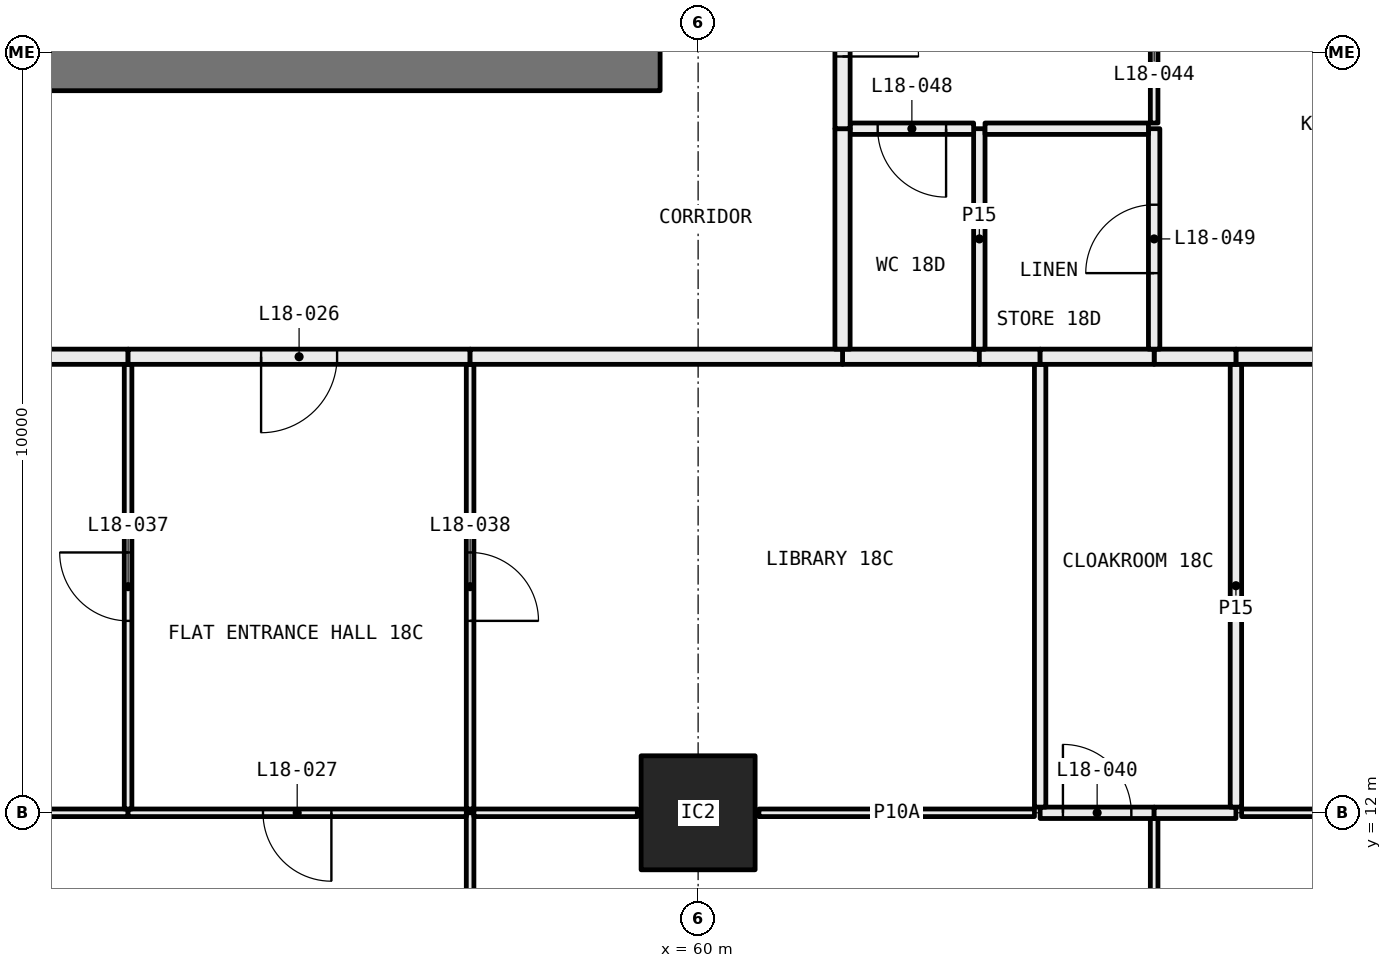
"""IFC4 building model, lengths in metres.
Left out: names, types, materials, properties, quantities, classifications, styles, units other than length and angle.
Written with IfcOpenShell. Run it as: python <this file> out.ifc"""

import sys

from ifc_helpers import new_model, si_unit, direction, frame, frame_2d, origin, origin_2d, place, context, subcontext, project, spatial, rectangle, hollow_rectangle, extrude, element, fill, save


model = new_model("IFC4")
c1 = context("Model", 3, precision=1e-05, world=origin(), true_north=direction((0.0, 1.0)))
c2 = subcontext(c1, "Body", "Model", "MODEL_VIEW")
j1 = project(units=[si_unit("LENGTHUNIT", "METRE"), si_unit("PLANEANGLEUNIT", "RADIAN")], contexts=[c1])
p1 = place(None, origin())
s1 = spatial("IfcSite", under=j1, at=p1, CompositionType="ELEMENT")
p2 = place(p1, origin())
s2 = spatial("IfcBuilding", under=s1, at=p2, CompositionType="ELEMENT")
p3 = place(p2, frame((0.0, 0.0, 74.85)))
s3 = spatial("IfcBuildingStorey", under=s2, at=p3, CompositionType="ELEMENT", Elevation=74.85)
p4 = place(p3, frame((60.0, 12.0, 0.0), z_axis=(0.0, 0.0, 1.0), x_axis=(1.0, 0.0, 0.0)))
e1 = element("IfcColumn", 1, at=p4, inside=s3, PredefinedType="COLUMN", context=c2, shape_type="SweptSolid", body=[
    extrude(hollow_rectangle(XDim=1.5, YDim=1.5, WallThickness=0.065, at=origin_2d()), origin(), (0.0, 0.0, 1.0), 3.05),
])
p5 = place(p3, frame((57.0, 6.05, 0.0), z_axis=(0.0, 0.0, 1.0), x_axis=(0.0, 1.0, 0.0)))
e2 = element("IfcWall", 2, at=p5, inside=s3, PredefinedType="PARTITIONING", context=c2, shape_type="SweptSolid", body=[
    extrude(rectangle(XDim=5.95, YDim=0.1, at=frame_2d((2.975, 0.0))), origin(), (0.0, 0.0, 1.0), 2.45),
])
p6 = place(p5, frame((2.525, 0.0, 0.0)))
e3 = element("IfcOpeningElement", 3, at=p6, cuts=e2, PredefinedType="OPENING", context=c2, shape_type="SweptSolid", body=[
    extrude(rectangle(XDim=0.9, YDim=2.1, at=frame_2d((0.45, 1.05))), frame((0.0, 0.06, 0.0), z_axis=(0.0, -1.0, 0.0), x_axis=(1.0, 0.0, 0.0)), (0.0, 0.0, 1.0), 0.12),
])
p7 = place(p3, frame((52.5, 12.0, 0.0), z_axis=(0.0, 0.0, 1.0), x_axis=(-1.0, 0.0, 0.0)))
e4 = element("IfcWall", 4, at=p7, inside=s3, PredefinedType="PARTITIONING", context=c2, shape_type="SweptSolid", body=[
    extrude(rectangle(XDim=3.7, YDim=0.1, at=frame_2d((1.85, 0.0))), origin(), (0.0, 0.0, 1.0), 2.45),
])
p8 = place(p3, frame((56.95, 12.0, 0.0), z_axis=(0.0, 0.0, 1.0), x_axis=(-1.0, 0.0, 0.0)))
e5 = element("IfcWall", 5, at=p8, inside=s3, PredefinedType="PARTITIONING", context=c2, shape_type="SweptSolid", body=[
    extrude(rectangle(XDim=4.45, YDim=0.1, at=frame_2d((2.225, 0.0))), origin(), (0.0, 0.0, 1.0), 2.45),
])
p9 = place(p8, frame((1.775, 0.0, 0.0)))
e6 = element("IfcOpeningElement", 6, at=p9, cuts=e5, PredefinedType="OPENING", context=c2, shape_type="SweptSolid", body=[
    extrude(rectangle(XDim=0.9, YDim=2.1, at=frame_2d((0.45, 1.05))), frame((0.0, 0.06, 0.0), z_axis=(0.0, -1.0, 0.0), x_axis=(1.0, 0.0, 0.0)), (0.0, 0.0, 1.0), 0.12),
])
p10 = place(p3, frame((66.0, 6.72, 0.0), z_axis=(0.0, 0.0, 1.0), x_axis=(0.0, 1.0, 0.0)))
e7 = element("IfcWall", 7, at=p10, inside=s3, PredefinedType="PARTITIONING", context=c2, shape_type="SweptSolid", body=[
    extrude(rectangle(XDim=5.205, YDim=0.1, at=frame_2d((2.603, 0.0))), origin(), (0.0, 0.0, 1.0), 2.45),
])
p11 = place(p10, frame((2.153, 0.0, 0.0)))
e8 = element("IfcOpeningElement", 8, at=p11, cuts=e7, PredefinedType="OPENING", context=c2, shape_type="SweptSolid", body=[
    extrude(rectangle(XDim=0.9, YDim=2.1, at=frame_2d((0.45, 1.05))), frame((0.0, 0.06, 0.0), z_axis=(0.0, -1.0, 0.0), x_axis=(1.0, 0.0, 0.0)), (0.0, 0.0, 1.0), 0.12),
])
p12 = place(p3, frame((59.2, 12.0, 0.0), z_axis=(0.0, 0.0, 1.0), x_axis=(-1.0, 0.0, 0.0)))
e9 = element("IfcWall", 9, at=p12, inside=s3, PredefinedType="PARTITIONING", context=c2, shape_type="SweptSolid", body=[
    extrude(rectangle(XDim=2.15, YDim=0.1, at=frame_2d((1.075, 0.0))), origin(), (0.0, 0.0, 1.0), 2.45),
])
p13 = place(p3, frame((64.425, 12.0, 0.0), z_axis=(0.0, 0.0, 1.0), x_axis=(-1.0, 0.0, 0.0)))
e10 = element("IfcWall", 10, at=p13, inside=s3, PredefinedType="PARTITIONING", context=c2, shape_type="SweptSolid", body=[
    extrude(rectangle(XDim=3.625, YDim=0.1, at=frame_2d((1.812, 0.0))), origin(), (0.0, 0.0, 1.0), 2.45),
])
p14 = place(p3, frame((66.0, 12.0, 0.0), z_axis=(0.0, 0.0, 1.0), x_axis=(-1.0, 0.0, 0.0)))
e11 = element("IfcWall", 11, at=p14, inside=s3, PredefinedType="PARTITIONING", context=c2, shape_type="SweptSolid", body=[
    extrude(rectangle(XDim=1.5, YDim=0.15, at=frame_2d((0.75, 0.0))), origin(), (0.0, 0.0, 1.0), 2.45),
])
p15 = place(p14, frame((0.3, 0.0, 0.0)))
e12 = element("IfcOpeningElement", 12, at=p15, cuts=e11, PredefinedType="OPENING", context=c2, shape_type="SweptSolid", body=[
    extrude(rectangle(XDim=0.9, YDim=2.1, at=frame_2d((0.45, 1.05))), frame((0.0, 0.085, 0.0), z_axis=(0.0, -1.0, 0.0), x_axis=(1.0, 0.0, 0.0)), (0.0, 0.0, 1.0), 0.17),
])
p16 = place(p3, frame((71.28, 12.0, 0.0), z_axis=(0.0, 0.0, 1.0), x_axis=(-1.0, 0.0, 0.0)))
e13 = element("IfcWall", 13, at=p16, inside=s3, PredefinedType="PARTITIONING", context=c2, shape_type="SweptSolid", body=[
    extrude(rectangle(XDim=4.129, YDim=0.1, at=frame_2d((2.064, 0.0))), origin(), (0.0, 0.0, 1.0), 2.45),
])
p17 = place(p16, frame((1.615, 0.0, 0.0)))
e14 = element("IfcOpeningElement", 14, at=p17, cuts=e13, PredefinedType="OPENING", context=c2, shape_type="SweptSolid", body=[
    extrude(rectangle(XDim=0.9, YDim=2.1, at=frame_2d((0.45, 1.05))), frame((0.0, 0.06, 0.0), z_axis=(0.0, -1.0, 0.0), x_axis=(1.0, 0.0, 0.0)), (0.0, 0.0, 1.0), 0.12),
])
p18 = place(p3, frame((67.076, 12.0, 0.0), z_axis=(0.0, 0.0, 1.0), x_axis=(-1.0, 0.0, 0.0)))
e15 = element("IfcWall", 15, at=p18, inside=s3, PredefinedType="PARTITIONING", context=c2, shape_type="SweptSolid", body=[
    extrude(rectangle(XDim=1.076, YDim=0.15, at=frame_2d((0.538, 0.0))), origin(), (0.0, 0.0, 1.0), 2.45),
])
p19 = place(p3, frame((52.5, 12.05, 0.0), z_axis=(0.0, 0.0, 1.0), x_axis=(0.0, 1.0, 0.0)))
e16 = element("IfcWall", 16, at=p19, inside=s3, PredefinedType="PARTITIONING", context=c2, shape_type="SweptSolid", body=[
    extrude(rectangle(XDim=5.85, YDim=0.1, at=frame_2d((2.925, 0.0))), origin(), (0.0, 0.0, 1.0), 2.45),
])
p20 = place(p19, frame((2.475, 0.0, 0.0)))
e17 = element("IfcOpeningElement", 17, at=p20, cuts=e16, PredefinedType="OPENING", context=c2, shape_type="SweptSolid", body=[
    extrude(rectangle(XDim=0.9, YDim=2.1, at=frame_2d((0.45, 1.05))), frame((0.0, 0.06, 0.0), z_axis=(0.0, -1.0, 0.0), x_axis=(1.0, 0.0, 0.0)), (0.0, 0.0, 1.0), 0.12),
])
p21 = place(p3, frame((52.5, 18.0, 0.0), z_axis=(0.0, 0.0, 1.0), x_axis=(-1.0, 0.0, 0.0)))
e18 = element("IfcWall", 18, at=p21, inside=s3, PredefinedType="PARTITIONING", context=c2, shape_type="SweptSolid", body=[
    extrude(rectangle(XDim=6.4, YDim=0.2, at=frame_2d((3.2, 0.0))), origin(), (0.0, 0.0, 1.0), 3.05),
])
p22 = place(p3, frame((57.0, 12.05, 0.0), z_axis=(0.0, 0.0, 1.0), x_axis=(0.0, 1.0, 0.0)))
e19 = element("IfcWall", 19, at=p22, inside=s3, PredefinedType="PARTITIONING", context=c2, shape_type="SweptSolid", body=[
    extrude(rectangle(XDim=5.85, YDim=0.1, at=frame_2d((2.925, 0.0))), origin(), (0.0, 0.0, 1.0), 2.45),
])
p23 = place(p22, frame((2.475, 0.0, 0.0)))
e20 = element("IfcOpeningElement", 20, at=p23, cuts=e19, PredefinedType="OPENING", context=c2, shape_type="SweptSolid", body=[
    extrude(rectangle(XDim=0.9, YDim=2.1, at=frame_2d((0.45, 1.05))), frame((0.0, 0.06, 0.0), z_axis=(0.0, -1.0, 0.0), x_axis=(1.0, 0.0, 0.0)), (0.0, 0.0, 1.0), 0.12),
])
p24 = place(p3, frame((57.0, 18.0, 0.0), z_axis=(0.0, 0.0, 1.0), x_axis=(-1.0, 0.0, 0.0)))
e21 = element("IfcWall", 21, at=p24, inside=s3, PredefinedType="PARTITIONING", context=c2, shape_type="SweptSolid", body=[
    extrude(rectangle(XDim=4.5, YDim=0.2, at=frame_2d((2.25, 0.0))), origin(), (0.0, 0.0, 1.0), 3.05),
])
p25 = place(p24, frame((1.75, 0.0, 0.0)))
e22 = element("IfcOpeningElement", 22, at=p25, cuts=e21, PredefinedType="OPENING", context=c2, shape_type="SweptSolid", body=[
    extrude(rectangle(XDim=1.0, YDim=2.1, at=frame_2d((0.5, 1.05))), frame((0.0, 0.11, 0.0), z_axis=(0.0, -1.0, 0.0), x_axis=(1.0, 0.0, 0.0)), (0.0, 0.0, 1.0), 0.22),
])
p26 = place(p3, frame((64.5, 12.075, 0.0), z_axis=(0.0, 0.0, 1.0), x_axis=(0.0, 1.0, 0.0)))
e23 = element("IfcWall", 23, at=p26, inside=s3, PredefinedType="PARTITIONING", context=c2, shape_type="SweptSolid", body=[
    extrude(rectangle(XDim=5.825, YDim=0.15, at=frame_2d((2.913, 0.0))), origin(), (0.0, 0.0, 1.0), 2.45),
])
p27 = place(p3, frame((63.7, 18.0, 0.0), z_axis=(0.0, 0.0, 1.0), x_axis=(-1.0, 0.0, 0.0)))
e24 = element("IfcWall", 24, at=p27, inside=s3, PredefinedType="PARTITIONING", context=c2, shape_type="SweptSolid", body=[
    extrude(rectangle(XDim=1.8, YDim=0.2, at=frame_2d((0.9, 0.0))), origin(), (0.0, 0.0, 1.0), 3.05),
])
p28 = place(p3, frame((64.5, 18.0, 0.0), z_axis=(0.0, 0.0, 1.0), x_axis=(-1.0, 0.0, 0.0)))
e25 = element("IfcWall", 25, at=p28, inside=s3, PredefinedType="PARTITIONING", context=c2, shape_type="SweptSolid", body=[
    extrude(rectangle(XDim=0.8, YDim=0.2, at=frame_2d((0.4, 0.0))), origin(), (0.0, 0.0, 1.0), 3.05),
])
p29 = place(p3, frame((61.9, 18.0, 0.0), z_axis=(0.0, 0.0, 1.0), x_axis=(-1.0, 0.0, 0.0)))
e26 = element("IfcWall", 26, at=p29, inside=s3, PredefinedType="PARTITIONING", context=c2, shape_type="SweptSolid", body=[
    extrude(rectangle(XDim=4.9, YDim=0.2, at=frame_2d((2.45, 0.0))), origin(), (0.0, 0.0, 1.0), 3.05),
])
p30 = place(p3, frame((67.076, 17.9, 0.0), z_axis=(0.0, 0.0, 1.0), x_axis=(0.0, -1.0, 0.0)))
e27 = element("IfcWall", 27, at=p30, inside=s3, PredefinedType="PARTITIONING", context=c2, shape_type="SweptSolid", body=[
    extrude(rectangle(XDim=5.825, YDim=0.15, at=frame_2d((2.913, 0.0))), origin(), (0.0, 0.0, 1.0), 2.45),
])
p31 = place(p3, frame((71.28, 18.0, 0.0), z_axis=(0.0, 0.0, 1.0), x_axis=(-1.0, 0.0, 0.0)))
e28 = element("IfcWall", 28, at=p31, inside=s3, PredefinedType="PARTITIONING", context=c2, shape_type="SweptSolid", body=[
    extrude(rectangle(XDim=4.204, YDim=0.2, at=frame_2d((2.102, 0.0))), origin(), (0.0, 0.0, 1.0), 3.05),
])
p32 = place(p3, frame((67.076, 18.0, 0.0), z_axis=(0.0, 0.0, 1.0), x_axis=(-1.0, 0.0, 0.0)))
e29 = element("IfcWall", 29, at=p32, inside=s3, PredefinedType="PARTITIONING", context=c2, shape_type="SweptSolid", body=[
    extrude(rectangle(XDim=1.076, YDim=0.2, at=frame_2d((0.538, 0.0))), origin(), (0.0, 0.0, 1.0), 3.05),
])
p33 = place(p3, frame((66.0, 18.0, 0.0), z_axis=(0.0, 0.0, 1.0), x_axis=(-1.0, 0.0, 0.0)))
e30 = element("IfcWall", 30, at=p33, inside=s3, PredefinedType="PARTITIONING", context=c2, shape_type="SweptSolid", body=[
    extrude(rectangle(XDim=1.5, YDim=0.2, at=frame_2d((0.75, 0.0))), origin(), (0.0, 0.0, 1.0), 3.05),
])
p34 = place(p3, frame((66.0, 21.0, 0.0), z_axis=(0.0, 0.0, 1.0), x_axis=(0.0, -1.0, 0.0)))
e31 = element("IfcWall", 31, at=p34, inside=s3, PredefinedType="PARTITIONING", context=c2, shape_type="SweptSolid", body=[
    extrude(rectangle(XDim=2.9, YDim=0.15, at=frame_2d((1.45, 0.0))), origin(), (0.0, 0.0, 1.0), 3.05),
])
p35 = place(p34, frame((1.0, 0.0, 0.0)))
e32 = element("IfcOpeningElement", 32, at=p35, cuts=e31, PredefinedType="OPENING", context=c2, shape_type="SweptSolid", body=[
    extrude(rectangle(XDim=0.9, YDim=2.1, at=frame_2d((0.45, 1.05))), frame((0.0, 0.085, 0.0), z_axis=(0.0, -1.0, 0.0), x_axis=(1.0, 0.0, 0.0)), (0.0, 0.0, 1.0), 0.17),
])
p36 = place(p3, frame((66.0, 23.95, 0.0), z_axis=(0.0, 0.0, 1.0), x_axis=(0.0, -1.0, 0.0)))
e33 = element("IfcWall", 33, at=p36, inside=s3, PredefinedType="PARTITIONING", context=c2, shape_type="SweptSolid", body=[
    extrude(rectangle(XDim=2.875, YDim=0.1, at=frame_2d((1.438, 0.0))), origin(), (0.0, 0.0, 1.0), 2.45),
])
p37 = place(p36, frame((0.988, 0.0, 0.0)))
e34 = element("IfcOpeningElement", 34, at=p37, cuts=e33, PredefinedType="OPENING", context=c2, shape_type="SweptSolid", body=[
    extrude(rectangle(XDim=0.9, YDim=2.1, at=frame_2d((0.45, 1.05))), frame((0.0, 0.06, 0.0), z_axis=(0.0, -1.0, 0.0), x_axis=(1.0, 0.0, 0.0)), (0.0, 0.0, 1.0), 0.12),
])
p38 = place(p3, frame((63.7, 18.1, 0.0), z_axis=(0.0, 0.0, 1.0), x_axis=(0.0, 1.0, 0.0)))
e35 = element("IfcWall", 35, at=p38, inside=s3, PredefinedType="PARTITIONING", context=c2, shape_type="SweptSolid", body=[
    extrude(rectangle(XDim=2.9, YDim=0.15, at=frame_2d((1.45, 0.0))), origin(), (0.0, 0.0, 1.0), 3.05),
])
p39 = place(p3, frame((63.625, 21.0, 0.0), z_axis=(0.0, 0.0, 1.0), x_axis=(-1.0, 0.0, 0.0)))
e36 = element("IfcWall", 36, at=p39, inside=s3, PredefinedType="PARTITIONING", context=c2, shape_type="SweptSolid", body=[
    extrude(rectangle(XDim=1.625, YDim=0.15, at=frame_2d((0.812, 0.0))), origin(), (0.0, 0.0, 1.0), 3.05),
])
p40 = place(p39, frame((0.363, 0.0, 0.0)))
e37 = element("IfcOpeningElement", 37, at=p40, cuts=e36, PredefinedType="OPENING", context=c2, shape_type="SweptSolid", body=[
    extrude(rectangle(XDim=0.9, YDim=2.1, at=frame_2d((0.45, 1.05))), frame((0.0, 0.085, 0.0), z_axis=(0.0, -1.0, 0.0), x_axis=(1.0, 0.0, 0.0)), (0.0, 0.0, 1.0), 0.17),
])
p41 = place(p3, frame((61.9, 21.0, 0.0), z_axis=(0.0, 0.0, 1.0), x_axis=(0.0, -1.0, 0.0)))
e38 = element("IfcWall", 38, at=p41, inside=s3, PredefinedType="PARTITIONING", context=c2, shape_type="SweptSolid", body=[
    extrude(rectangle(XDim=2.9, YDim=0.2, at=frame_2d((1.45, 0.0))), origin(), (0.0, 0.0, 1.0), 3.05),
])
p42 = place(p3, frame((65.925, 21.0, 0.0), z_axis=(0.0, 0.0, 1.0), x_axis=(-1.0, 0.0, 0.0)))
e39 = element("IfcWall", 39, at=p42, inside=s3, PredefinedType="PARTITIONING", context=c2, shape_type="SweptSolid", body=[
    extrude(rectangle(XDim=2.15, YDim=0.15, at=frame_2d((1.075, 0.0))), origin(), (0.0, 0.0, 1.0), 3.05),
])
p43 = place(p3, frame((61.9, 23.9, 0.0), z_axis=(0.0, 0.0, 1.0), x_axis=(0.0, -1.0, 0.0)))
e40 = element("IfcWall", 40, at=p43, inside=s3, PredefinedType="PARTITIONING", context=c2, shape_type="SweptSolid", body=[
    extrude(rectangle(XDim=2.9, YDim=0.2, at=frame_2d((1.45, 0.0))), origin(), (0.0, 0.0, 1.0), 3.05),
])
p44 = place(p43, frame((0.95, 0.0, 0.0)))
e41 = element("IfcOpeningElement", 41, at=p44, cuts=e40, PredefinedType="OPENING", context=c2, shape_type="SweptSolid", body=[
    extrude(rectangle(XDim=1.0, YDim=2.1, at=frame_2d((0.5, 1.05))), frame((0.0, 0.11, 0.0), z_axis=(0.0, -1.0, 0.0), x_axis=(1.0, 0.0, 0.0)), (0.0, 0.0, 1.0), 0.22),
])
p45 = place(p3, frame((59.5, 21.9, 0.0), z_axis=(0.0, 0.0, 1.0), x_axis=(-1.0, 0.0, 0.0)))
e42 = element("IfcWall", 42, at=p45, inside=s3, PredefinedType="SHEAR", context=c2, shape_type="SweptSolid", body=[
    extrude(rectangle(XDim=11.0, YDim=0.8, at=frame_2d((5.5, 0.0))), origin(), (0.0, 0.0, 1.0), 3.05),
])
p46 = place(p25, origin())
e43 = element("IfcDoor", 43, at=p46, inside=s3, OperationType="SINGLE_SWING_LEFT", PredefinedType="DOOR", context=c2, shape_type="SweptSolid", body=[
    extrude(rectangle(XDim=1.0, YDim=2.1, at=frame_2d((0.5, 1.05))), frame((0.0, 0.025, 0.0), z_axis=(0.0, -1.0, 0.0), x_axis=(1.0, 0.0, 0.0)), (0.0, 0.0, 1.0), 0.05),
])
fill(e22, e43)
p47 = place(p9, origin())
e44 = element("IfcDoor", 44, at=p47, inside=s3, OperationType="SINGLE_SWING_RIGHT", PredefinedType="DOOR", context=c2, shape_type="SweptSolid", body=[
    extrude(rectangle(XDim=0.9, YDim=2.1, at=frame_2d((0.45, 1.05))), frame((0.0, 0.025, 0.0), z_axis=(0.0, -1.0, 0.0), x_axis=(1.0, 0.0, 0.0)), (0.0, 0.0, 1.0), 0.05),
])
fill(e6, e44)
p48 = place(p20, origin())
e45 = element("IfcDoor", 45, at=p48, inside=s3, OperationType="SINGLE_SWING_LEFT", PredefinedType="DOOR", context=c2, shape_type="SweptSolid", body=[
    extrude(rectangle(XDim=0.9, YDim=2.1, at=frame_2d((0.45, 1.05))), frame((0.0, 0.025, 0.0), z_axis=(0.0, -1.0, 0.0), x_axis=(1.0, 0.0, 0.0)), (0.0, 0.0, 1.0), 0.05),
])
fill(e17, e45)
p49 = place(p23, frame((0.9, 0.0, 0.0), x_axis=(-1.0, 0.0, 0.0)))
e46 = element("IfcDoor", 46, at=p49, inside=s3, OperationType="SINGLE_SWING_LEFT", PredefinedType="DOOR", context=c2, shape_type="SweptSolid", body=[
    extrude(rectangle(XDim=0.9, YDim=2.1, at=frame_2d((0.45, 1.05))), frame((0.0, 0.025, 0.0), z_axis=(0.0, -1.0, 0.0), x_axis=(1.0, 0.0, 0.0)), (0.0, 0.0, 1.0), 0.05),
])
fill(e20, e46)
p50 = place(p15, frame((0.9, 0.0, 0.0), x_axis=(-1.0, 0.0, 0.0)))
e47 = element("IfcDoor", 47, at=p50, inside=s3, OperationType="SINGLE_SWING_RIGHT", PredefinedType="DOOR", context=c2, shape_type="SweptSolid", body=[
    extrude(rectangle(XDim=0.9, YDim=2.1, at=frame_2d((0.45, 1.05))), frame((0.0, 0.025, 0.0), z_axis=(0.0, -1.0, 0.0), x_axis=(1.0, 0.0, 0.0)), (0.0, 0.0, 1.0), 0.05),
])
fill(e12, e47)
p51 = place(p44, origin())
e48 = element("IfcDoor", 48, at=p51, inside=s3, OperationType="SINGLE_SWING_LEFT", PredefinedType="DOOR", context=c2, shape_type="SweptSolid", body=[
    extrude(rectangle(XDim=1.0, YDim=2.1, at=frame_2d((0.5, 1.05))), frame((0.0, 0.025, 0.0), z_axis=(0.0, -1.0, 0.0), x_axis=(1.0, 0.0, 0.0)), (0.0, 0.0, 1.0), 0.05),
])
fill(e41, e48)
p52 = place(p40, origin())
e49 = element("IfcDoor", 49, at=p52, inside=s3, OperationType="SINGLE_SWING_RIGHT", PredefinedType="DOOR", context=c2, shape_type="SweptSolid", body=[
    extrude(rectangle(XDim=0.9, YDim=2.1, at=frame_2d((0.45, 1.05))), frame((0.0, 0.025, 0.0), z_axis=(0.0, -1.0, 0.0), x_axis=(1.0, 0.0, 0.0)), (0.0, 0.0, 1.0), 0.05),
])
fill(e37, e49)
p53 = place(p35, frame((0.9, 0.0, 0.0), x_axis=(-1.0, 0.0, 0.0)))
e50 = element("IfcDoor", 50, at=p53, inside=s3, OperationType="SINGLE_SWING_RIGHT", PredefinedType="DOOR", context=c2, shape_type="SweptSolid", body=[
    extrude(rectangle(XDim=0.9, YDim=2.1, at=frame_2d((0.45, 1.05))), frame((0.0, 0.025, 0.0), z_axis=(0.0, -1.0, 0.0), x_axis=(1.0, 0.0, 0.0)), (0.0, 0.0, 1.0), 0.05),
])
fill(e32, e50)
save(model, sys.argv[1])
